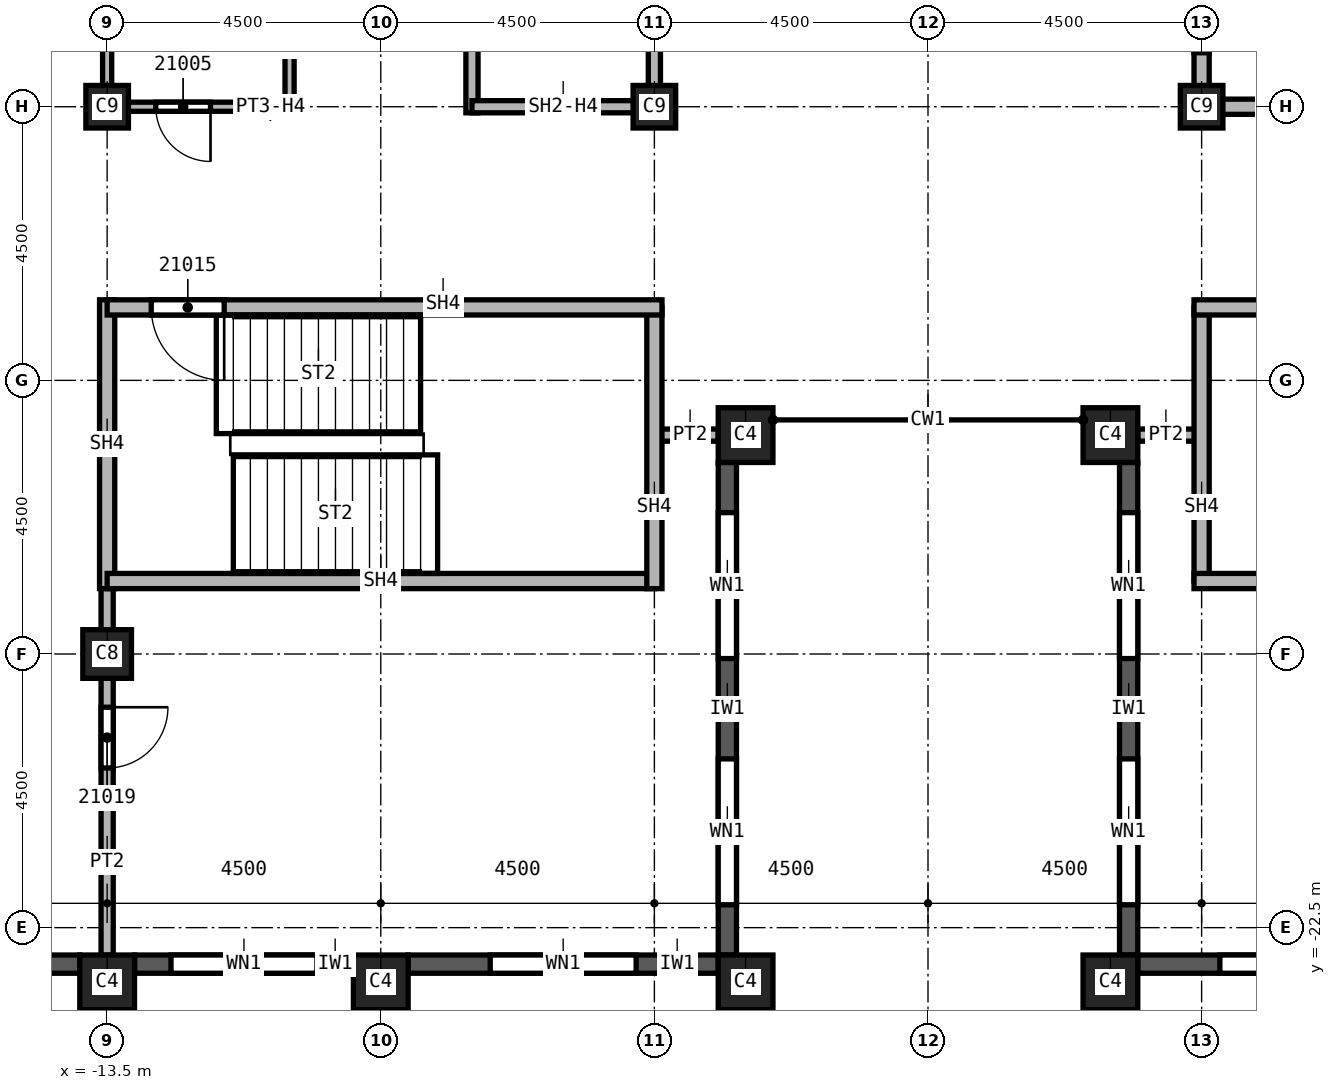
"""IFC4 building model, lengths in metres.
Left out: names, types, materials, properties, quantities, classifications, styles, units other than length and angle.
Written with IfcOpenShell. Run it as: python <this file> out.ifc"""

import sys

from ifc_helpers import new_model, si_unit, direction, frame, frame_2d, origin, origin_2d, place, context, subcontext, project, spatial, rectangle, extrude, element, fill, save


model = new_model("IFC4")
c1 = context("Model", 3, precision=1e-05, world=origin(), true_north=direction((0.0, 1.0)))
c2 = subcontext(c1, "Body", "Model", "MODEL_VIEW")
j1 = project(units=[si_unit("LENGTHUNIT", "METRE"), si_unit("PLANEANGLEUNIT", "RADIAN")], contexts=[c1])
p1 = place(None, origin())
s1 = spatial("IfcSite", under=j1, at=p1, CompositionType="ELEMENT")
p2 = place(p1, origin())
s2 = spatial("IfcBuilding", under=s1, at=p2, CompositionType="ELEMENT")
p3 = place(p2, frame((0.0, 0.0, 304.0)))
s3 = spatial("IfcBuildingStorey", under=s2, at=p3, CompositionType="ELEMENT", Elevation=304.0)
p4 = place(p3, frame((-13.5, -18.0, 0.0), z_axis=(0.0, 0.0, 1.0), x_axis=(1.0, 0.0, 0.0)))
e1 = element("IfcColumn", 1, at=p4, inside=s3, PredefinedType="COLUMN", context=c2, shape_type="SweptSolid", body=[
    extrude(rectangle(XDim=0.8, YDim=0.8, at=origin_2d()), origin(), (0.0, 0.0, 1.0), 3.74),
])
for number, where, z_axis, x_axis in (
    (2, (4.5, -9.0, 0.0), (0.0, 0.0, 1.0), (1.0, 0.0, 0.0)),
    (3, (-4.5, -9.0, 0.0), (0.0, 0.0, 1.0), (1.0, 0.0, 0.0)),
    (4, (-13.5, -9.0, 0.0), (0.0, 0.0, 1.0), (1.0, 0.0, 0.0)),
):
    element("IfcColumn", number, at=place(p3, frame(where, z_axis=z_axis, x_axis=x_axis)), inside=s3, PredefinedType="COLUMN", context=c2, shape_type="SweptSolid", body=[
        extrude(rectangle(XDim=0.7, YDim=0.7, at=origin_2d()), origin(), (0.0, 0.0, 1.0), 3.74),
    ])
for number, where, z_axis, x_axis in (
    (5, (3.0, -23.4, 0.0), (0.0, 0.0, 1.0), (1.0, 0.0, 0.0)),
    (6, (-3.0, -23.4, 0.0), (0.0, 0.0, 1.0), (1.0, 0.0, 0.0)),
    (7, (-9.0, -23.4, 0.0), (0.0, 0.0, 1.0), (1.0, 0.0, 0.0)),
    (8, (-13.5, -23.4, 0.0), (0.0, 0.0, 1.0), (1.0, 0.0, 0.0)),
    (9, (3.0, -14.4, 0.0), (0.0, 0.0, 1.0), (1.0, 0.0, 0.0)),
    (10, (-3.0, -14.4, 0.0), (0.0, 0.0, 1.0), (1.0, 0.0, 0.0)),
):
    element("IfcColumn", number, at=place(p3, frame(where, z_axis=z_axis, x_axis=x_axis)), inside=s3, PredefinedType="COLUMN", context=c2, shape_type="SweptSolid", body=[
        extrude(rectangle(XDim=0.9, YDim=0.9, at=origin_2d()), origin(), (0.0, 0.0, 1.0), 3.74),
    ])
p5 = place(p3, frame((-17.55, -23.1, 0.0), z_axis=(0.0, 0.0, 1.0), x_axis=(1.0, 0.0, 0.0)))
e11 = element("IfcWall", 11, at=p5, inside=s3, PredefinedType="SOLIDWALL", context=c2, shape_type="SweptSolid", body=[
    extrude(rectangle(XDim=3.6, YDim=0.3, at=frame_2d((1.8, 0.0))), origin(), (0.0, 0.0, 1.0), 3.14),
])
p6 = place(p5, frame((0.775, 0.0, 0.8)))
e12 = element("IfcOpeningElement", 12, at=p6, cuts=e11, PredefinedType="OPENING", context=c2, shape_type="SweptSolid", body=[
    extrude(rectangle(XDim=1.0, YDim=1.95, at=frame_2d((0.5, 0.975))), frame((0.0, 0.15, 0.0), z_axis=(0.0, -1.0, 0.0), x_axis=(1.0, 0.0, 0.0)), (0.0, 0.0, 1.0), 0.3),
])
p7 = place(p5, frame((2.375, 0.0, 0.8)))
e13 = element("IfcOpeningElement", 13, at=p7, cuts=e11, PredefinedType="OPENING", context=c2, shape_type="SweptSolid", body=[
    extrude(rectangle(XDim=0.6, YDim=1.95, at=frame_2d((0.3, 0.975))), frame((0.0, 0.15, 0.0), z_axis=(0.0, -1.0, 0.0), x_axis=(1.0, 0.0, 0.0)), (0.0, 0.0, 1.0), 0.3),
])
p8 = place(p3, frame((-13.05, -23.1, 0.0), z_axis=(0.0, 0.0, 1.0), x_axis=(1.0, 0.0, 0.0)))
e14 = element("IfcWall", 14, at=p8, inside=s3, PredefinedType="SOLIDWALL", context=c2, shape_type="SweptSolid", body=[
    extrude(rectangle(XDim=3.6, YDim=0.3, at=frame_2d((1.8, 0.0))), origin(), (0.0, 0.0, 1.0), 3.14),
])
p9 = place(p8, frame((0.6, 0.0, 0.8)))
e15 = element("IfcOpeningElement", 15, at=p9, cuts=e14, PredefinedType="OPENING", context=c2, shape_type="SweptSolid", body=[
    extrude(rectangle(XDim=2.4, YDim=1.95, at=frame_2d((1.2, 0.975))), frame((0.0, 0.15, 0.0), z_axis=(0.0, -1.0, 0.0), x_axis=(1.0, 0.0, 0.0)), (0.0, 0.0, 1.0), 0.3),
])
p10 = place(p3, frame((-8.55, -23.1, 0.0), z_axis=(0.0, 0.0, 1.0), x_axis=(1.0, 0.0, 0.0)))
e16 = element("IfcWall", 16, at=p10, inside=s3, PredefinedType="SOLIDWALL", context=c2, shape_type="SweptSolid", body=[
    extrude(rectangle(XDim=5.1, YDim=0.3, at=frame_2d((2.55, 0.0))), origin(), (0.0, 0.0, 1.0), 3.14),
])
p11 = place(p10, frame((1.35, 0.0, 0.8)))
e17 = element("IfcOpeningElement", 17, at=p11, cuts=e16, PredefinedType="OPENING", context=c2, shape_type="SweptSolid", body=[
    extrude(rectangle(XDim=2.4, YDim=1.95, at=frame_2d((1.2, 0.975))), frame((0.0, 0.15, 0.0), z_axis=(0.0, -1.0, 0.0), x_axis=(1.0, 0.0, 0.0)), (0.0, 0.0, 1.0), 0.3),
])
p12 = place(p3, frame((-3.3, -22.95, 0.0), z_axis=(0.0, 0.0, 1.0), x_axis=(0.0, 1.0, 0.0)))
e18 = element("IfcWall", 18, at=p12, inside=s3, PredefinedType="SOLIDWALL", context=c2, shape_type="SweptSolid", body=[
    extrude(rectangle(XDim=8.1, YDim=0.3, at=frame_2d((4.05, 0.0))), origin(), (0.0, 0.0, 1.0), 3.14),
])
p13 = place(p12, frame((0.825, 0.0, 0.8)))
e19 = element("IfcOpeningElement", 19, at=p13, cuts=e18, PredefinedType="OPENING", context=c2, shape_type="SweptSolid", body=[
    extrude(rectangle(XDim=2.4, YDim=1.95, at=frame_2d((1.2, 0.975))), frame((0.0, 0.15, 0.0), z_axis=(0.0, -1.0, 0.0), x_axis=(1.0, 0.0, 0.0)), (0.0, 0.0, 1.0), 0.3),
])
p14 = place(p12, frame((4.875, 0.0, 0.8)))
e20 = element("IfcOpeningElement", 20, at=p14, cuts=e18, PredefinedType="OPENING", context=c2, shape_type="SweptSolid", body=[
    extrude(rectangle(XDim=2.4, YDim=1.95, at=frame_2d((1.2, 0.975))), frame((0.0, 0.15, 0.0), z_axis=(0.0, -1.0, 0.0), x_axis=(1.0, 0.0, 0.0)), (0.0, 0.0, 1.0), 0.3),
])
p15 = place(p3, frame((3.3, -14.85, 0.0), z_axis=(0.0, 0.0, 1.0), x_axis=(0.0, -1.0, 0.0)))
e21 = element("IfcWall", 21, at=p15, inside=s3, PredefinedType="SOLIDWALL", context=c2, shape_type="SweptSolid", body=[
    extrude(rectangle(XDim=8.1, YDim=0.3, at=frame_2d((4.05, 0.0))), origin(), (0.0, 0.0, 1.0), 3.14),
])
p16 = place(p15, frame((0.825, 0.0, 0.8)))
e22 = element("IfcOpeningElement", 22, at=p16, cuts=e21, PredefinedType="OPENING", context=c2, shape_type="SweptSolid", body=[
    extrude(rectangle(XDim=2.4, YDim=1.95, at=frame_2d((1.2, 0.975))), frame((0.0, 0.15, 0.0), z_axis=(0.0, -1.0, 0.0), x_axis=(1.0, 0.0, 0.0)), (0.0, 0.0, 1.0), 0.3),
])
p17 = place(p15, frame((4.875, 0.0, 0.8)))
e23 = element("IfcOpeningElement", 23, at=p17, cuts=e21, PredefinedType="OPENING", context=c2, shape_type="SweptSolid", body=[
    extrude(rectangle(XDim=2.4, YDim=1.95, at=frame_2d((1.2, 0.975))), frame((0.0, 0.15, 0.0), z_axis=(0.0, -1.0, 0.0), x_axis=(1.0, 0.0, 0.0)), (0.0, 0.0, 1.0), 0.3),
])
p18 = place(p3, frame((3.45, -23.1, 0.0), z_axis=(0.0, 0.0, 1.0), x_axis=(1.0, 0.0, 0.0)))
e24 = element("IfcWall", 24, at=p18, inside=s3, PredefinedType="SOLIDWALL", context=c2, shape_type="SweptSolid", body=[
    extrude(rectangle(XDim=5.1, YDim=0.3, at=frame_2d((2.55, 0.0))), origin(), (0.0, 0.0, 1.0), 3.14),
])
p19 = place(p18, frame((1.35, 0.0, 0.8)))
e25 = element("IfcOpeningElement", 25, at=p19, cuts=e24, PredefinedType="OPENING", context=c2, shape_type="SweptSolid", body=[
    extrude(rectangle(XDim=2.4, YDim=1.95, at=frame_2d((1.2, 0.975))), frame((0.0, 0.15, 0.0), z_axis=(0.0, -1.0, 0.0), x_axis=(1.0, 0.0, 0.0)), (0.0, 0.0, 1.0), 0.3),
])
p20 = place(p3, frame((-13.5, -16.675, 0.0), z_axis=(0.0, 0.0, 1.0), x_axis=(0.0, -1.0, 0.0)))
e26 = element("IfcWall", 26, at=p20, inside=s3, PredefinedType="PARTITIONING", context=c2, shape_type="SweptSolid", body=[
    extrude(rectangle(XDim=6.275, YDim=0.2, at=frame_2d((3.137, 0.0))), origin(), (0.0, 0.0, 1.0), 3.74),
])
p21 = place(p20, frame((2.2, 0.0, 0.0)))
e27 = element("IfcOpeningElement", 27, at=p21, cuts=e26, PredefinedType="OPENING", context=c2, shape_type="SweptSolid", body=[
    extrude(rectangle(XDim=1.0, YDim=2.1, at=frame_2d((0.5, 1.05))), frame((0.0, 0.1, 0.0), z_axis=(0.0, -1.0, 0.0), x_axis=(1.0, 0.0, 0.0)), (0.0, 0.0, 1.0), 0.2),
])
for number, where, z_axis, x_axis in (
    (28, (-3.45, -14.4, 0.0), (0.0, 0.0, 1.0), (-1.0, 0.0, 0.0)),
    (29, (4.5, -14.4, 0.0), (0.0, 0.0, 1.0), (-1.0, 0.0, 0.0)),
):
    element("IfcWall", number, at=place(p3, frame(where, z_axis=z_axis, x_axis=x_axis)), inside=s3, PredefinedType="PARTITIONING", context=c2, shape_type="SweptSolid", body=[
        extrude(rectangle(XDim=1.05, YDim=0.2, at=frame_2d((0.525, 0.0))), origin(), (0.0, 0.0, 1.0), 3.74),
    ])
p22 = place(p3, frame((-7.5, -9.1, 0.0), z_axis=(0.0, 0.0, 1.0), x_axis=(0.0, 1.0, 0.0)))
e30 = element("IfcWall", 30, at=p22, inside=s3, PredefinedType="SOLIDWALL", context=c2, shape_type="SweptSolid", body=[
    extrude(rectangle(XDim=6.225, YDim=0.2, at=frame_2d((3.113, 0.0))), origin(), (0.0, 0.0, 1.0), 3.74),
])
p23 = place(p3, frame((-4.5, -9.0, 0.0), z_axis=(0.0, 0.0, 1.0), x_axis=(-1.0, 0.0, 0.0)))
e31 = element("IfcWall", 31, at=p23, inside=s3, PredefinedType="SOLIDWALL", context=c2, shape_type="SweptSolid", body=[
    extrude(rectangle(XDim=3.0, YDim=0.2, at=frame_2d((1.5, 0.0))), origin(), (0.0, 0.0, 1.0), 3.062),
])
p24 = place(p3, frame((-4.5, 6.0, 0.0), z_axis=(0.0, 0.0, 1.0), x_axis=(0.0, -1.0, 0.0)))
e32 = element("IfcWall", 32, at=p24, inside=s3, PredefinedType="SOLIDWALL", context=c2, shape_type="SweptSolid", body=[
    extrude(rectangle(XDim=15.1, YDim=0.2, at=frame_2d((7.55, 0.0))), origin(), (0.0, 0.0, 1.0), 3.062),
])
p25 = place(p24, frame((6.85, 0.0, 0.0)))
e33 = element("IfcOpeningElement", 33, at=p25, cuts=e32, PredefinedType="OPENING", context=c2, shape_type="SweptSolid", body=[
    extrude(rectangle(XDim=1.1, YDim=2.1, at=frame_2d((0.55, 1.05))), frame((0.0, 0.1, 0.0), z_axis=(0.0, -1.0, 0.0), x_axis=(1.0, 0.0, 0.0)), (0.0, 0.0, 1.0), 0.2),
])
p26 = place(p24, frame((1.6, 0.0, 0.0)))
e34 = element("IfcOpeningElement", 34, at=p26, cuts=e32, PredefinedType="OPENING", context=c2, shape_type="SweptSolid", body=[
    extrude(rectangle(XDim=1.1, YDim=2.1, at=frame_2d((0.55, 1.05))), frame((0.0, 0.1, 0.0), z_axis=(0.0, -1.0, 0.0), x_axis=(1.0, 0.0, 0.0)), (0.0, 0.0, 1.0), 0.2),
])
p27 = place(p3, frame((4.5, -9.125, 0.0), z_axis=(0.0, 0.0, 1.0), x_axis=(0.0, 1.0, 0.0)))
e35 = element("IfcWall", 35, at=p27, inside=s3, PredefinedType="SOLIDWALL", context=c2, shape_type="SweptSolid", body=[
    extrude(rectangle(XDim=3.125, YDim=0.25, at=frame_2d((1.562, 0.0))), origin(), (0.0, 0.0, 1.0), 3.062),
])
p28 = place(p27, frame((1.012, 0.0, 0.0)))
e36 = element("IfcOpeningElement", 36, at=p28, cuts=e35, PredefinedType="OPENING", context=c2, shape_type="SweptSolid", body=[
    extrude(rectangle(XDim=1.1, YDim=2.1, at=frame_2d((0.55, 1.05))), frame((0.0, 0.125, 0.0), z_axis=(0.0, -1.0, 0.0), x_axis=(1.0, 0.0, 0.0)), (0.0, 0.0, 1.0), 0.25),
])
p29 = place(p3, frame((7.5, -9.0, 0.0), z_axis=(0.0, 0.0, 1.0), x_axis=(-1.0, 0.0, 0.0)))
e37 = element("IfcWall", 37, at=p29, inside=s3, PredefinedType="SOLIDWALL", context=c2, shape_type="SweptSolid", body=[
    extrude(rectangle(XDim=3.0, YDim=0.25, at=frame_2d((1.5, 0.0))), origin(), (0.0, 0.0, 1.0), 3.062),
])
p30 = place(p3, frame((-13.5, -12.175, 0.0), z_axis=(0.0, 0.0, 1.0), x_axis=(0.0, -1.0, 0.0)))
e38 = element("IfcWall", 38, at=p30, inside=s3, PredefinedType="SOLIDWALL", context=c2, shape_type="SweptSolid", body=[
    extrude(rectangle(XDim=4.75, YDim=0.25, at=frame_2d((2.375, 0.0))), origin(), (0.0, 0.0, 1.0), 3.74),
])
p31 = place(p3, frame((-4.5, -16.8, 0.0), z_axis=(0.0, 0.0, 1.0), x_axis=(-1.0, 0.0, 0.0)))
e39 = element("IfcWall", 39, at=p31, inside=s3, PredefinedType="SOLIDWALL", context=c2, shape_type="SweptSolid", body=[
    extrude(rectangle(XDim=9.0, YDim=0.25, at=frame_2d((4.5, 0.0))), origin(), (0.0, 0.0, 1.0), 3.74),
])
p32 = place(p3, frame((-4.5, -12.3, 0.0), z_axis=(0.0, 0.0, 1.0), x_axis=(0.0, -1.0, 0.0)))
e40 = element("IfcWall", 40, at=p32, inside=s3, PredefinedType="SOLIDWALL", context=c2, shape_type="SweptSolid", body=[
    extrude(rectangle(XDim=4.625, YDim=0.25, at=frame_2d((2.312, 0.0))), origin(), (0.0, 0.0, 1.0), 3.74),
])
p33 = place(p3, frame((-4.375, -12.3, 0.0), z_axis=(0.0, 0.0, 1.0), x_axis=(-1.0, 0.0, 0.0)))
e41 = element("IfcWall", 41, at=p33, inside=s3, PredefinedType="SOLIDWALL", context=c2, shape_type="SweptSolid", body=[
    extrude(rectangle(XDim=9.125, YDim=0.25, at=frame_2d((4.562, 0.0))), origin(), (0.0, 0.0, 1.0), 3.74),
])
p34 = place(p33, frame((7.2, 0.0, 0.0)))
e42 = element("IfcOpeningElement", 42, at=p34, cuts=e41, PredefinedType="OPENING", context=c2, shape_type="SweptSolid", body=[
    extrude(rectangle(XDim=1.2, YDim=2.1, at=frame_2d((0.6, 1.05))), frame((0.0, 0.125, 0.0), z_axis=(0.0, -1.0, 0.0), x_axis=(1.0, 0.0, 0.0)), (0.0, 0.0, 1.0), 0.25),
])
p35 = place(p3, frame((4.5, -16.8, 0.0), z_axis=(0.0, 0.0, 1.0), x_axis=(0.0, 1.0, 0.0)))
e43 = element("IfcWall", 43, at=p35, inside=s3, PredefinedType="SOLIDWALL", context=c2, shape_type="SweptSolid", body=[
    extrude(rectangle(XDim=4.5, YDim=0.25, at=frame_2d((2.25, 0.0))), origin(), (0.0, 0.0, 1.0), 3.74),
])
p36 = place(p3, frame((13.5, -16.8, 0.0), z_axis=(0.0, 0.0, 1.0), x_axis=(-1.0, 0.0, 0.0)))
e44 = element("IfcWall", 44, at=p36, inside=s3, PredefinedType="SOLIDWALL", context=c2, shape_type="SweptSolid", body=[
    extrude(rectangle(XDim=9.125, YDim=0.25, at=frame_2d((4.562, 0.0))), origin(), (0.0, 0.0, 1.0), 3.74),
])
p37 = place(p3, frame((13.5, -12.3, 0.0), z_axis=(0.0, 0.0, 1.0), x_axis=(-1.0, 0.0, 0.0)))
e45 = element("IfcWall", 45, at=p37, inside=s3, PredefinedType="SOLIDWALL", context=c2, shape_type="SweptSolid", body=[
    extrude(rectangle(XDim=9.125, YDim=0.25, at=frame_2d((4.562, 0.0))), origin(), (0.0, 0.0, 1.0), 3.74),
])
p38 = place(p37, frame((0.6, 0.0, 0.0)))
e46 = element("IfcOpeningElement", 46, at=p38, cuts=e45, PredefinedType="OPENING", context=c2, shape_type="SweptSolid", body=[
    extrude(rectangle(XDim=1.2, YDim=2.1, at=frame_2d((0.6, 1.05))), frame((0.0, 0.125, 0.0), z_axis=(0.0, -1.0, 0.0), x_axis=(1.0, 0.0, 0.0)), (0.0, 0.0, 1.0), 0.25),
])
p39 = place(p3, frame((-13.5, -9.075, 0.0), z_axis=(0.0, 0.0, 1.0), x_axis=(0.0, 1.0, 0.0)))
e47 = element("IfcWall", 47, at=p39, inside=s3, PredefinedType="PARTITIONING", context=c2, shape_type="SweptSolid", body=[
    extrude(rectangle(XDim=2.075, YDim=0.15, at=frame_2d((1.038, 0.0))), origin(), (0.0, 0.0, 1.0), 3.062),
])
p40 = place(p3, frame((-10.5, -9.075, 0.0), z_axis=(0.0, 0.0, 1.0), x_axis=(0.0, 1.0, 0.0)))
e48 = element("IfcWall", 48, at=p40, inside=s3, PredefinedType="PARTITIONING", context=c2, shape_type="SweptSolid", body=[
    extrude(rectangle(XDim=2.15, YDim=0.15, at=frame_2d((1.075, 0.0))), origin(), (0.0, 0.0, 1.0), 3.74),
])
p41 = place(p3, frame((-10.5, -9.0, 0.0), z_axis=(0.0, 0.0, 1.0), x_axis=(-1.0, 0.0, 0.0)))
e49 = element("IfcWall", 49, at=p41, inside=s3, PredefinedType="PARTITIONING", context=c2, shape_type="SweptSolid", body=[
    extrude(rectangle(XDim=3.0, YDim=0.15, at=frame_2d((1.5, 0.0))), origin(), (0.0, 0.0, 1.0), 3.062),
])
p42 = place(p41, frame((1.3, 0.0, 0.0)))
e50 = element("IfcOpeningElement", 50, at=p42, cuts=e49, PredefinedType="OPENING", context=c2, shape_type="SweptSolid", body=[
    extrude(rectangle(XDim=0.9, YDim=2.1, at=frame_2d((0.45, 1.05))), frame((0.0, 0.075, 0.0), z_axis=(0.0, -1.0, 0.0), x_axis=(1.0, 0.0, 0.0)), (0.0, 0.0, 1.0), 0.15),
])
p43 = place(p9, origin())
e51 = element("IfcWindow", 51, at=p43, inside=s3, PartitioningType="SINGLE_PANEL", PredefinedType="WINDOW", context=c2, shape_type="SweptSolid", body=[
    extrude(rectangle(XDim=2.4, YDim=1.95, at=frame_2d((1.2, 0.975))), frame((0.0, 0.03, 0.0), z_axis=(0.0, -1.0, 0.0), x_axis=(1.0, 0.0, 0.0)), (0.0, 0.0, 1.0), 0.06),
])
fill(e15, e51)
p44 = place(p11, origin())
e52 = element("IfcWindow", 52, at=p44, inside=s3, PartitioningType="SINGLE_PANEL", PredefinedType="WINDOW", context=c2, shape_type="SweptSolid", body=[
    extrude(rectangle(XDim=2.4, YDim=1.95, at=frame_2d((1.2, 0.975))), frame((0.0, 0.03, 0.0), z_axis=(0.0, -1.0, 0.0), x_axis=(1.0, 0.0, 0.0)), (0.0, 0.0, 1.0), 0.06),
])
fill(e17, e52)
p45 = place(p13, origin())
e53 = element("IfcWindow", 53, at=p45, inside=s3, PartitioningType="SINGLE_PANEL", PredefinedType="WINDOW", context=c2, shape_type="SweptSolid", body=[
    extrude(rectangle(XDim=2.4, YDim=1.95, at=frame_2d((1.2, 0.975))), frame((0.0, 0.03, 0.0), z_axis=(0.0, -1.0, 0.0), x_axis=(1.0, 0.0, 0.0)), (0.0, 0.0, 1.0), 0.06),
])
fill(e19, e53)
p46 = place(p14, origin())
e54 = element("IfcWindow", 54, at=p46, inside=s3, PartitioningType="SINGLE_PANEL", PredefinedType="WINDOW", context=c2, shape_type="SweptSolid", body=[
    extrude(rectangle(XDim=2.4, YDim=1.95, at=frame_2d((1.2, 0.975))), frame((0.0, 0.03, 0.0), z_axis=(0.0, -1.0, 0.0), x_axis=(1.0, 0.0, 0.0)), (0.0, 0.0, 1.0), 0.06),
])
fill(e20, e54)
p47 = place(p16, origin())
e55 = element("IfcWindow", 55, at=p47, inside=s3, PartitioningType="SINGLE_PANEL", PredefinedType="WINDOW", context=c2, shape_type="SweptSolid", body=[
    extrude(rectangle(XDim=2.4, YDim=1.95, at=frame_2d((1.2, 0.975))), frame((0.0, 0.03, 0.0), z_axis=(0.0, -1.0, 0.0), x_axis=(1.0, 0.0, 0.0)), (0.0, 0.0, 1.0), 0.06),
])
fill(e22, e55)
p48 = place(p17, origin())
e56 = element("IfcWindow", 56, at=p48, inside=s3, PartitioningType="SINGLE_PANEL", PredefinedType="WINDOW", context=c2, shape_type="SweptSolid", body=[
    extrude(rectangle(XDim=2.4, YDim=1.95, at=frame_2d((1.2, 0.975))), frame((0.0, 0.03, 0.0), z_axis=(0.0, -1.0, 0.0), x_axis=(1.0, 0.0, 0.0)), (0.0, 0.0, 1.0), 0.06),
])
fill(e23, e56)
p49 = place(p19, origin())
e57 = element("IfcWindow", 57, at=p49, inside=s3, PartitioningType="SINGLE_PANEL", PredefinedType="WINDOW", context=c2, shape_type="SweptSolid", body=[
    extrude(rectangle(XDim=2.4, YDim=1.95, at=frame_2d((1.2, 0.975))), frame((0.0, 0.03, 0.0), z_axis=(0.0, -1.0, 0.0), x_axis=(1.0, 0.0, 0.0)), (0.0, 0.0, 1.0), 0.06),
])
fill(e25, e57)
p50 = place(p42, origin())
e58 = element("IfcDoor", 58, at=p50, inside=s3, OperationType="SINGLE_SWING_RIGHT", PredefinedType="DOOR", context=c2, shape_type="SweptSolid", body=[
    extrude(rectangle(XDim=0.9, YDim=2.1, at=frame_2d((0.45, 1.05))), frame((0.0, 0.025, 0.0), z_axis=(0.0, -1.0, 0.0), x_axis=(1.0, 0.0, 0.0)), (0.0, 0.0, 1.0), 0.05),
])
fill(e50, e58)
p51 = place(p34, origin())
e59 = element("IfcDoor", 59, at=p51, inside=s3, OperationType="SINGLE_SWING_RIGHT", PredefinedType="DOOR", context=c2, shape_type="SweptSolid", body=[
    extrude(rectangle(XDim=1.2, YDim=2.1, at=frame_2d((0.6, 1.05))), frame((0.0, 0.025, 0.0), z_axis=(0.0, -1.0, 0.0), x_axis=(1.0, 0.0, 0.0)), (0.0, 0.0, 1.0), 0.05),
])
fill(e42, e59)
p52 = place(p21, origin())
e60 = element("IfcDoor", 60, at=p52, inside=s3, OperationType="SINGLE_SWING_RIGHT", PredefinedType="DOOR", context=c2, shape_type="SweptSolid", body=[
    extrude(rectangle(XDim=1.0, YDim=2.1, at=frame_2d((0.5, 1.05))), frame((0.0, 0.025, 0.0), z_axis=(0.0, -1.0, 0.0), x_axis=(1.0, 0.0, 0.0)), (0.0, 0.0, 1.0), 0.05),
])
fill(e27, e60)
p53 = place(p28, origin())
e61 = element("IfcDoor", 61, at=p53, inside=s3, OperationType="SLIDING_TO_LEFT", PredefinedType="DOOR", context=c2, shape_type="SweptSolid", body=[
    extrude(rectangle(XDim=1.1, YDim=2.1, at=frame_2d((0.55, 1.05))), frame((0.0, 0.025, 0.0), z_axis=(0.0, -1.0, 0.0), x_axis=(1.0, 0.0, 0.0)), (0.0, 0.0, 1.0), 0.05),
])
fill(e36, e61)
save(model, sys.argv[1])
